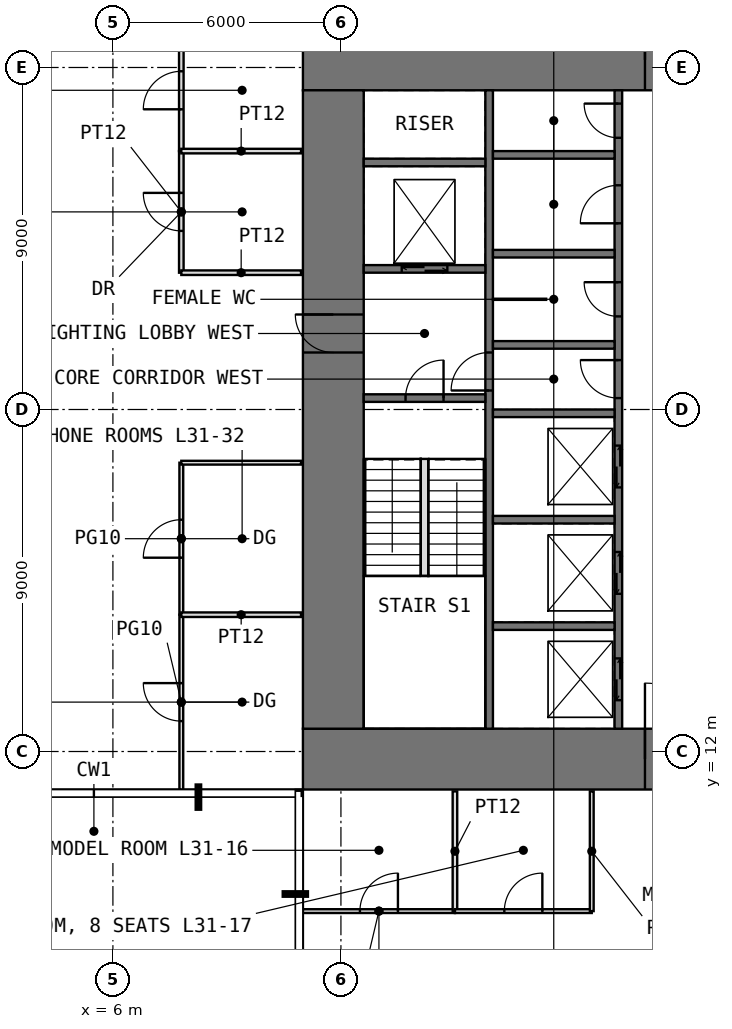
"""IFC4 building model, lengths in metres.
Left out: names, types, materials, properties, quantities, classifications, styles, units other than length and angle.
Written with IfcOpenShell. Run it as: python <this file> out.ifc"""

import sys

from ifc_helpers import new_model, si_unit, direction, frame, frame_2d, origin, place, context, subcontext, project, spatial, rectangle, extrude, element, fill, save


model = new_model("IFC4")
c1 = context("Model", 3, precision=1e-05, world=origin(), true_north=direction((0.0, 1.0)))
c2 = subcontext(c1, "Body", "Model", "MODEL_VIEW")
j1 = project(units=[si_unit("LENGTHUNIT", "METRE"), si_unit("PLANEANGLEUNIT", "RADIAN")], contexts=[c1])
p1 = place(None, origin())
s1 = spatial("IfcSite", under=j1, at=p1, CompositionType="ELEMENT")
p2 = place(p1, origin())
s2 = spatial("IfcBuilding", under=s1, at=p2, CompositionType="ELEMENT")
p3 = place(p2, frame((0.0, 0.0, 132.5)))
s3 = spatial("IfcBuildingStorey", under=s2, at=p3, CompositionType="ELEMENT", Elevation=132.5)
p4 = place(p3, frame((11.0, 11.8, -0.05), z_axis=(0.0, 0.0, 1.0), x_axis=(1.0, 0.0, 0.0)))
e1 = element("IfcWall", 1, at=p4, inside=s3, PredefinedType="SHEAR", context=c2, shape_type="SweptSolid", body=[
    extrude(rectangle(XDim=20.0, YDim=1.6, at=frame_2d((10.0, 0.0))), origin(), (0.0, 0.0, 1.0), 4.0),
])
p5 = place(p4, frame((9.0, 0.0, 0.05)))
e2 = element("IfcOpeningElement", 2, at=p5, cuts=e1, PredefinedType="OPENING", context=c2, shape_type="SweptSolid", body=[
    extrude(rectangle(XDim=2.0, YDim=2.2, at=frame_2d((1.0, 1.1))), frame((0.0, 0.81, 0.0), z_axis=(0.0, -1.0, 0.0), x_axis=(1.0, 0.0, 0.0)), (0.0, 0.0, 1.0), 1.62),
])
p6 = place(p3, frame((11.0, 30.2, -0.05), z_axis=(0.0, 0.0, 1.0), x_axis=(1.0, 0.0, 0.0)))
e3 = element("IfcWall", 3, at=p6, inside=s3, PredefinedType="SHEAR", context=c2, shape_type="SweptSolid", body=[
    extrude(rectangle(XDim=20.0, YDim=1.6, at=frame_2d((10.0, 0.0))), origin(), (0.0, 0.0, 1.0), 4.0),
])
p7 = place(p6, frame((9.0, 0.0, 0.05)))
e4 = element("IfcOpeningElement", 4, at=p7, cuts=e3, PredefinedType="OPENING", context=c2, shape_type="SweptSolid", body=[
    extrude(rectangle(XDim=2.0, YDim=2.2, at=frame_2d((1.0, 1.1))), frame((0.0, 0.81, 0.0), z_axis=(0.0, -1.0, 0.0), x_axis=(1.0, 0.0, 0.0)), (0.0, 0.0, 1.0), 1.62),
])
p8 = place(p3, frame((11.8, 12.6, -0.05), z_axis=(0.0, 0.0, 1.0), x_axis=(0.0, 1.0, 0.0)))
e5 = element("IfcWall", 5, at=p8, inside=s3, PredefinedType="SHEAR", context=c2, shape_type="SweptSolid", body=[
    extrude(rectangle(XDim=16.8, YDim=1.6, at=frame_2d((8.4, 0.0))), origin(), (0.0, 0.0, 1.0), 4.0),
])
p9 = place(p8, frame((9.9, 0.0, 0.05)))
e6 = element("IfcOpeningElement", 6, at=p9, cuts=e5, PredefinedType="OPENING", context=c2, shape_type="SweptSolid", body=[
    extrude(rectangle(XDim=1.0, YDim=2.2, at=frame_2d((0.5, 1.1))), frame((0.0, 0.81, 0.0), z_axis=(0.0, -1.0, 0.0), x_axis=(1.0, 0.0, 0.0)), (0.0, 0.0, 1.0), 1.62),
])
p10 = place(p3, frame((15.9, 12.6, -0.05), z_axis=(0.0, 0.0, 1.0), x_axis=(0.0, 1.0, 0.0)))
e7 = element("IfcWall", 7, at=p10, inside=s3, PredefinedType="SHEAR", context=c2, shape_type="SweptSolid", body=[
    extrude(rectangle(XDim=16.8, YDim=0.2, at=frame_2d((8.4, 0.0))), origin(), (0.0, 0.0, 1.0), 4.0),
])
p11 = place(p10, frame((8.9, 0.0, 0.05)))
e8 = element("IfcOpeningElement", 8, at=p11, cuts=e7, PredefinedType="OPENING", context=c2, shape_type="SweptSolid", body=[
    extrude(rectangle(XDim=1.0, YDim=2.2, at=frame_2d((0.5, 1.1))), frame((0.0, 0.11, 0.0), z_axis=(0.0, -1.0, 0.0), x_axis=(1.0, 0.0, 0.0)), (0.0, 0.0, 1.0), 0.22),
])
p12 = place(p3, frame((19.3, 12.6, -0.05), z_axis=(0.0, 0.0, 1.0), x_axis=(0.0, 1.0, 0.0)))
e9 = element("IfcWall", 9, at=p12, inside=s3, PredefinedType="SHEAR", context=c2, shape_type="SweptSolid", body=[
    extrude(rectangle(XDim=16.8, YDim=0.2, at=frame_2d((8.4, 0.0))), origin(), (0.0, 0.0, 1.0), 4.0),
])
p13 = place(p12, frame((8.7, 0.0, 0.05)))
e10 = element("IfcOpeningElement", 10, at=p13, cuts=e9, PredefinedType="OPENING", context=c2, shape_type="SweptSolid", body=[
    extrude(rectangle(XDim=1.0, YDim=2.2, at=frame_2d((0.5, 1.1))), frame((0.0, 0.11, 0.0), z_axis=(0.0, -1.0, 0.0), x_axis=(1.0, 0.0, 0.0)), (0.0, 0.0, 1.0), 0.22),
])
p14 = place(p12, frame((10.85, 0.0, 0.05)))
e11 = element("IfcOpeningElement", 11, at=p14, cuts=e9, PredefinedType="OPENING", context=c2, shape_type="SweptSolid", body=[
    extrude(rectangle(XDim=0.9, YDim=2.2, at=frame_2d((0.45, 1.1))), frame((0.0, 0.11, 0.0), z_axis=(0.0, -1.0, 0.0), x_axis=(1.0, 0.0, 0.0)), (0.0, 0.0, 1.0), 0.22),
])
p15 = place(p12, frame((13.3, 0.0, 0.05)))
e12 = element("IfcOpeningElement", 12, at=p15, cuts=e9, PredefinedType="OPENING", context=c2, shape_type="SweptSolid", body=[
    extrude(rectangle(XDim=1.0, YDim=2.2, at=frame_2d((0.5, 1.1))), frame((0.0, 0.11, 0.0), z_axis=(0.0, -1.0, 0.0), x_axis=(1.0, 0.0, 0.0)), (0.0, 0.0, 1.0), 0.22),
])
p16 = place(p12, frame((15.55, 0.0, 0.05)))
e13 = element("IfcOpeningElement", 13, at=p16, cuts=e9, PredefinedType="OPENING", context=c2, shape_type="SweptSolid", body=[
    extrude(rectangle(XDim=0.9, YDim=2.2, at=frame_2d((0.45, 1.1))), frame((0.0, 0.11, 0.0), z_axis=(0.0, -1.0, 0.0), x_axis=(1.0, 0.0, 0.0)), (0.0, 0.0, 1.0), 0.22),
])
p17 = place(p12, frame((0.75, 0.0, 0.05)))
e14 = element("IfcOpeningElement", 14, at=p17, cuts=e9, PredefinedType="OPENING", context=c2, shape_type="SweptSolid", body=[
    extrude(rectangle(XDim=1.1, YDim=2.2, at=frame_2d((0.55, 1.1))), frame((0.0, 0.11, 0.0), z_axis=(0.0, -1.0, 0.0), x_axis=(1.0, 0.0, 0.0)), (0.0, 0.0, 1.0), 0.22),
])
p18 = place(p12, frame((3.55, 0.0, 0.05)))
e15 = element("IfcOpeningElement", 15, at=p18, cuts=e9, PredefinedType="OPENING", context=c2, shape_type="SweptSolid", body=[
    extrude(rectangle(XDim=1.1, YDim=2.2, at=frame_2d((0.55, 1.1))), frame((0.0, 0.11, 0.0), z_axis=(0.0, -1.0, 0.0), x_axis=(1.0, 0.0, 0.0)), (0.0, 0.0, 1.0), 0.22),
])
p19 = place(p12, frame((6.35, 0.0, 0.05)))
e16 = element("IfcOpeningElement", 16, at=p19, cuts=e9, PredefinedType="OPENING", context=c2, shape_type="SweptSolid", body=[
    extrude(rectangle(XDim=1.1, YDim=2.2, at=frame_2d((0.55, 1.1))), frame((0.0, 0.11, 0.0), z_axis=(0.0, -1.0, 0.0), x_axis=(1.0, 0.0, 0.0)), (0.0, 0.0, 1.0), 0.22),
])
p20 = place(p3, frame((12.6, 21.3, -0.05), z_axis=(0.0, 0.0, 1.0), x_axis=(1.0, 0.0, 0.0)))
e17 = element("IfcWall", 17, at=p20, inside=s3, PredefinedType="SHEAR", context=c2, shape_type="SweptSolid", body=[
    extrude(rectangle(XDim=3.2, YDim=0.2, at=frame_2d((1.6, 0.0))), origin(), (0.0, 0.0, 1.0), 4.0),
])
p21 = place(p20, frame((1.1, 0.0, 0.05)))
e18 = element("IfcOpeningElement", 18, at=p21, cuts=e17, PredefinedType="OPENING", context=c2, shape_type="SweptSolid", body=[
    extrude(rectangle(XDim=1.0, YDim=2.2, at=frame_2d((0.5, 1.1))), frame((0.0, 0.11, 0.0), z_axis=(0.0, -1.0, 0.0), x_axis=(1.0, 0.0, 0.0)), (0.0, 0.0, 1.0), 0.22),
])
p22 = place(p3, frame((12.6, 24.7, -0.05), z_axis=(0.0, 0.0, 1.0), x_axis=(1.0, 0.0, 0.0)))
e19 = element("IfcWall", 19, at=p22, inside=s3, PredefinedType="SHEAR", context=c2, shape_type="SweptSolid", body=[
    extrude(rectangle(XDim=3.2, YDim=0.2, at=frame_2d((1.6, 0.0))), origin(), (0.0, 0.0, 1.0), 4.0),
])
p23 = place(p22, frame((1.0, 0.0, 0.05)))
e20 = element("IfcOpeningElement", 20, at=p23, cuts=e19, PredefinedType="OPENING", context=c2, shape_type="SweptSolid", body=[
    extrude(rectangle(XDim=1.2, YDim=2.2, at=frame_2d((0.6, 1.1))), frame((0.0, 0.11, 0.0), z_axis=(0.0, -1.0, 0.0), x_axis=(1.0, 0.0, 0.0)), (0.0, 0.0, 1.0), 0.22),
])
for number, where, z_axis, x_axis in (
    (21, (12.6, 27.5, -0.05), (0.0, 0.0, 1.0), (1.0, 0.0, 0.0)),
    (22, (16.0, 15.3, -0.05), (0.0, 0.0, 1.0), (1.0, 0.0, 0.0)),
    (23, (16.0, 18.1, -0.05), (0.0, 0.0, 1.0), (1.0, 0.0, 0.0)),
    (24, (16.0, 20.9, -0.05), (0.0, 0.0, 1.0), (1.0, 0.0, 0.0)),
    (25, (16.0, 22.7, -0.05), (0.0, 0.0, 1.0), (1.0, 0.0, 0.0)),
    (26, (16.0, 25.1, -0.05), (0.0, 0.0, 1.0), (1.0, 0.0, 0.0)),
    (27, (16.0, 27.7, -0.05), (0.0, 0.0, 1.0), (1.0, 0.0, 0.0)),
):
    element("IfcWall", number, at=place(p3, frame(where, z_axis=z_axis, x_axis=x_axis)), inside=s3, PredefinedType="SHEAR", context=c2, shape_type="SweptSolid", body=[
        extrude(rectangle(XDim=3.2, YDim=0.2, at=frame_2d((1.6, 0.0))), origin(), (0.0, 0.0, 1.0), 4.0),
    ])
p24 = place(p3, frame((16.0, 23.9, 0.0), z_axis=(0.0, 0.0, 1.0), x_axis=(1.0, 0.0, 0.0)))
e28 = element("IfcWall", 28, at=p24, inside=s3, PredefinedType="PARTITIONING", context=c2, shape_type="SweptSolid", body=[
    extrude(rectangle(XDim=1.4, YDim=0.03, at=frame_2d((0.7, 0.0))), origin(), (0.0, 0.0, 1.0), 3.75),
])
p25 = place(p3, frame((7.8, 11.0, 0.0), z_axis=(0.0, 0.0, 1.0), x_axis=(0.0, 1.0, 0.0)))
e29 = element("IfcWall", 29, at=p25, inside=s3, PredefinedType="PARTITIONING", context=c2, shape_type="SweptSolid", body=[
    extrude(rectangle(XDim=4.6, YDim=0.1, at=frame_2d((2.3, 0.0))), origin(), (0.0, 0.0, 1.0), 3.75),
])
p26 = place(p25, frame((1.8, 0.0, 0.0)))
e30 = element("IfcOpeningElement", 30, at=p26, cuts=e29, PredefinedType="OPENING", context=c2, shape_type="SweptSolid", body=[
    extrude(rectangle(XDim=1.0, YDim=2.4, at=frame_2d((0.5, 1.2))), frame((0.0, 0.06, 0.0), z_axis=(0.0, -1.0, 0.0), x_axis=(1.0, 0.0, 0.0)), (0.0, 0.0, 1.0), 0.12),
])
p27 = place(p3, frame((7.8, 15.6, 0.0), z_axis=(0.0, 0.0, 1.0), x_axis=(0.0, 1.0, 0.0)))
e31 = element("IfcWall", 31, at=p27, inside=s3, PredefinedType="PARTITIONING", context=c2, shape_type="SweptSolid", body=[
    extrude(rectangle(XDim=4.0, YDim=0.1, at=frame_2d((2.0, 0.0))), origin(), (0.0, 0.0, 1.0), 3.75),
])
p28 = place(p27, frame((1.5, 0.0, 0.0)))
e32 = element("IfcOpeningElement", 32, at=p28, cuts=e31, PredefinedType="OPENING", context=c2, shape_type="SweptSolid", body=[
    extrude(rectangle(XDim=1.0, YDim=2.4, at=frame_2d((0.5, 1.2))), frame((0.0, 0.06, 0.0), z_axis=(0.0, -1.0, 0.0), x_axis=(1.0, 0.0, 0.0)), (0.0, 0.0, 1.0), 0.12),
])
p29 = place(p3, frame((7.8, 15.6, 0.0), z_axis=(0.0, 0.0, 1.0), x_axis=(1.0, 0.0, 0.0)))
e33 = element("IfcWall", 33, at=p29, inside=s3, PredefinedType="PARTITIONING", context=c2, shape_type="SweptSolid", body=[
    extrude(rectangle(XDim=3.15, YDim=0.12, at=frame_2d((1.575, 0.0))), origin(), (0.0, 0.0, 1.0), 3.75),
])
p30 = place(p3, frame((7.8, 19.6, 0.0), z_axis=(0.0, 0.0, 1.0), x_axis=(1.0, 0.0, 0.0)))
e34 = element("IfcWall", 34, at=p30, inside=s3, PredefinedType="PARTITIONING", context=c2, shape_type="SweptSolid", body=[
    extrude(rectangle(XDim=3.15, YDim=0.1, at=frame_2d((1.575, 0.0))), origin(), (0.0, 0.0, 1.0), 3.75),
])
p31 = place(p3, frame((7.8, 24.6, 0.0), z_axis=(0.0, 0.0, 1.0), x_axis=(0.0, 1.0, 0.0)))
e35 = element("IfcWall", 35, at=p31, inside=s3, PredefinedType="PARTITIONING", context=c2, shape_type="SweptSolid", body=[
    extrude(rectangle(XDim=3.2, YDim=0.12, at=frame_2d((1.6, 0.0))), origin(), (0.0, 0.0, 1.0), 3.75),
])
p32 = place(p31, frame((1.1, 0.0, 0.0)))
e36 = element("IfcOpeningElement", 36, at=p32, cuts=e35, PredefinedType="OPENING", context=c2, shape_type="SweptSolid", body=[
    extrude(rectangle(XDim=1.0, YDim=2.2, at=frame_2d((0.5, 1.1))), frame((0.0, 0.07, 0.0), z_axis=(0.0, -1.0, 0.0), x_axis=(1.0, 0.0, 0.0)), (0.0, 0.0, 1.0), 0.14),
])
p33 = place(p3, frame((7.8, 24.6, 0.0), z_axis=(0.0, 0.0, 1.0), x_axis=(1.0, 0.0, 0.0)))
e37 = element("IfcWall", 37, at=p33, inside=s3, PredefinedType="PARTITIONING", context=c2, shape_type="SweptSolid", body=[
    extrude(rectangle(XDim=3.15, YDim=0.12, at=frame_2d((1.575, 0.0))), origin(), (0.0, 0.0, 1.0), 3.75),
])
p34 = place(p3, frame((7.8, 27.8, 0.0), z_axis=(0.0, 0.0, 1.0), x_axis=(0.0, 1.0, 0.0)))
e38 = element("IfcWall", 38, at=p34, inside=s3, PredefinedType="PARTITIONING", context=c2, shape_type="SweptSolid", body=[
    extrude(rectangle(XDim=3.2, YDim=0.12, at=frame_2d((1.6, 0.0))), origin(), (0.0, 0.0, 1.0), 3.75),
])
p35 = place(p34, frame((1.1, 0.0, 0.0)))
e39 = element("IfcOpeningElement", 39, at=p35, cuts=e38, PredefinedType="OPENING", context=c2, shape_type="SweptSolid", body=[
    extrude(rectangle(XDim=1.0, YDim=2.2, at=frame_2d((0.5, 1.1))), frame((0.0, 0.07, 0.0), z_axis=(0.0, -1.0, 0.0), x_axis=(1.0, 0.0, 0.0)), (0.0, 0.0, 1.0), 0.14),
])
p36 = place(p3, frame((7.8, 27.8, 0.0), z_axis=(0.0, 0.0, 1.0), x_axis=(1.0, 0.0, 0.0)))
e40 = element("IfcWall", 40, at=p36, inside=s3, PredefinedType="PARTITIONING", context=c2, shape_type="SweptSolid", body=[
    extrude(rectangle(XDim=3.15, YDim=0.12, at=frame_2d((1.575, 0.0))), origin(), (0.0, 0.0, 1.0), 3.75),
])
p37 = place(p3, frame((11.0, 7.8, 0.0), z_axis=(0.0, 0.0, 1.0), x_axis=(1.0, 0.0, 0.0)))
e41 = element("IfcWall", 41, at=p37, inside=s3, PredefinedType="PARTITIONING", context=c2, shape_type="SweptSolid", body=[
    extrude(rectangle(XDim=4.0, YDim=0.1, at=frame_2d((2.0, 0.0))), origin(), (0.0, 0.0, 1.0), 3.75),
])
p38 = place(p37, frame((1.5, 0.0, 0.0)))
e42 = element("IfcOpeningElement", 42, at=p38, cuts=e41, PredefinedType="OPENING", context=c2, shape_type="SweptSolid", body=[
    extrude(rectangle(XDim=1.0, YDim=2.4, at=frame_2d((0.5, 1.2))), frame((0.0, 0.06, 0.0), z_axis=(0.0, -1.0, 0.0), x_axis=(1.0, 0.0, 0.0)), (0.0, 0.0, 1.0), 0.12),
])
p39 = place(p3, frame((15.0, 7.8, 0.0), z_axis=(0.0, 0.0, 1.0), x_axis=(0.0, 1.0, 0.0)))
e43 = element("IfcWall", 43, at=p39, inside=s3, PredefinedType="PARTITIONING", context=c2, shape_type="SweptSolid", body=[
    extrude(rectangle(XDim=3.15, YDim=0.12, at=frame_2d((1.575, 0.0))), origin(), (0.0, 0.0, 1.0), 3.75),
])
p40 = place(p3, frame((15.0, 7.8, 0.0), z_axis=(0.0, 0.0, 1.0), x_axis=(1.0, 0.0, 0.0)))
e44 = element("IfcWall", 44, at=p40, inside=s3, PredefinedType="PARTITIONING", context=c2, shape_type="SweptSolid", body=[
    extrude(rectangle(XDim=3.6, YDim=0.1, at=frame_2d((1.8, 0.0))), origin(), (0.0, 0.0, 1.0), 3.75),
])
p41 = place(p40, frame((1.3, 0.0, 0.0)))
e45 = element("IfcOpeningElement", 45, at=p41, cuts=e44, PredefinedType="OPENING", context=c2, shape_type="SweptSolid", body=[
    extrude(rectangle(XDim=1.0, YDim=2.4, at=frame_2d((0.5, 1.2))), frame((0.0, 0.06, 0.0), z_axis=(0.0, -1.0, 0.0), x_axis=(1.0, 0.0, 0.0)), (0.0, 0.0, 1.0), 0.12),
])
p42 = place(p3, frame((18.6, 7.8, 0.0), z_axis=(0.0, 0.0, 1.0), x_axis=(0.0, 1.0, 0.0)))
e46 = element("IfcWall", 46, at=p42, inside=s3, PredefinedType="PARTITIONING", context=c2, shape_type="SweptSolid", body=[
    extrude(rectangle(XDim=3.15, YDim=0.1, at=frame_2d((1.575, 0.0))), origin(), (0.0, 0.0, 1.0), 3.75),
])
p43 = place(p3, frame((14.2, 16.62, 0.0), z_axis=(0.0, 0.0, 1.0), x_axis=(0.0, 1.0, 0.0)))
e47 = element("IfcWall", 47, at=p43, inside=s3, PredefinedType="PARTITIONING", context=c2, shape_type="SweptSolid", body=[
    extrude(rectangle(XDim=3.08, YDim=0.2, at=frame_2d((1.54, 0.0))), origin(), (0.0, 0.0, 1.0), 4.0),
])
p44 = place(p5, origin())
e48 = element("IfcDoor", 48, at=p44, inside=s3, OperationType="DOUBLE_DOOR_SINGLE_SWING", PredefinedType="DOOR", context=c2, shape_type="SweptSolid", body=[
    extrude(rectangle(XDim=2.0, YDim=2.2, at=frame_2d((1.0, 1.1))), frame((0.0, 0.025, 0.0), z_axis=(0.0, -1.0, 0.0), x_axis=(1.0, 0.0, 0.0)), (0.0, 0.0, 1.0), 0.05),
])
fill(e2, e48)
p45 = place(p7, origin())
e49 = element("IfcDoor", 49, at=p45, inside=s3, OperationType="DOUBLE_DOOR_SINGLE_SWING", PredefinedType="DOOR", context=c2, shape_type="SweptSolid", body=[
    extrude(rectangle(XDim=2.0, YDim=2.2, at=frame_2d((1.0, 1.1))), frame((0.0, 0.025, 0.0), z_axis=(0.0, -1.0, 0.0), x_axis=(1.0, 0.0, 0.0)), (0.0, 0.0, 1.0), 0.05),
])
fill(e4, e49)
p46 = place(p9, origin())
e50 = element("IfcDoor", 50, at=p46, inside=s3, OperationType="SINGLE_SWING_RIGHT", PredefinedType="DOOR", context=c2, shape_type="SweptSolid", body=[
    extrude(rectangle(XDim=1.0, YDim=2.2, at=frame_2d((0.5, 1.1))), frame((0.0, 0.025, 0.0), z_axis=(0.0, -1.0, 0.0), x_axis=(1.0, 0.0, 0.0)), (0.0, 0.0, 1.0), 0.05),
])
fill(e6, e50)
p47 = place(p21, origin())
e51 = element("IfcDoor", 51, at=p47, inside=s3, OperationType="SINGLE_SWING_RIGHT", PredefinedType="DOOR", context=c2, shape_type="SweptSolid", body=[
    extrude(rectangle(XDim=1.0, YDim=2.2, at=frame_2d((0.5, 1.1))), frame((0.0, 0.025, 0.0), z_axis=(0.0, -1.0, 0.0), x_axis=(1.0, 0.0, 0.0)), (0.0, 0.0, 1.0), 0.05),
])
fill(e18, e51)
p48 = place(p11, origin())
e52 = element("IfcDoor", 52, at=p48, inside=s3, OperationType="SINGLE_SWING_LEFT", PredefinedType="DOOR", context=c2, shape_type="SweptSolid", body=[
    extrude(rectangle(XDim=1.0, YDim=2.2, at=frame_2d((0.5, 1.1))), frame((0.0, 0.025, 0.0), z_axis=(0.0, -1.0, 0.0), x_axis=(1.0, 0.0, 0.0)), (0.0, 0.0, 1.0), 0.05),
])
fill(e8, e52)
p49 = place(p13, origin())
e53 = element("IfcDoor", 53, at=p49, inside=s3, OperationType="SINGLE_SWING_RIGHT", PredefinedType="DOOR", context=c2, shape_type="SweptSolid", body=[
    extrude(rectangle(XDim=1.0, YDim=2.2, at=frame_2d((0.5, 1.1))), frame((0.0, 0.025, 0.0), z_axis=(0.0, -1.0, 0.0), x_axis=(1.0, 0.0, 0.0)), (0.0, 0.0, 1.0), 0.05),
])
fill(e10, e53)
p50 = place(p14, origin())
e54 = element("IfcDoor", 54, at=p50, inside=s3, OperationType="SINGLE_SWING_RIGHT", PredefinedType="DOOR", context=c2, shape_type="SweptSolid", body=[
    extrude(rectangle(XDim=0.9, YDim=2.2, at=frame_2d((0.45, 1.1))), frame((0.0, 0.025, 0.0), z_axis=(0.0, -1.0, 0.0), x_axis=(1.0, 0.0, 0.0)), (0.0, 0.0, 1.0), 0.05),
])
fill(e11, e54)
p51 = place(p15, origin())
e55 = element("IfcDoor", 55, at=p51, inside=s3, OperationType="SINGLE_SWING_LEFT", PredefinedType="DOOR", context=c2, shape_type="SweptSolid", body=[
    extrude(rectangle(XDim=1.0, YDim=2.2, at=frame_2d((0.5, 1.1))), frame((0.0, 0.025, 0.0), z_axis=(0.0, -1.0, 0.0), x_axis=(1.0, 0.0, 0.0)), (0.0, 0.0, 1.0), 0.05),
])
fill(e12, e55)
p52 = place(p16, origin())
e56 = element("IfcDoor", 56, at=p52, inside=s3, OperationType="SINGLE_SWING_RIGHT", PredefinedType="DOOR", context=c2, shape_type="SweptSolid", body=[
    extrude(rectangle(XDim=0.9, YDim=2.2, at=frame_2d((0.45, 1.1))), frame((0.0, 0.025, 0.0), z_axis=(0.0, -1.0, 0.0), x_axis=(1.0, 0.0, 0.0)), (0.0, 0.0, 1.0), 0.05),
])
fill(e13, e56)
p53 = place(p38, origin())
e57 = element("IfcDoor", 57, at=p53, inside=s3, OperationType="SINGLE_SWING_RIGHT", PredefinedType="DOOR", context=c2, shape_type="SweptSolid", body=[
    extrude(rectangle(XDim=1.0, YDim=2.4, at=frame_2d((0.5, 1.2))), frame((0.0, 0.025, 0.0), z_axis=(0.0, -1.0, 0.0), x_axis=(1.0, 0.0, 0.0)), (0.0, 0.0, 1.0), 0.05),
])
fill(e42, e57)
p54 = place(p41, origin())
e58 = element("IfcDoor", 58, at=p54, inside=s3, OperationType="SINGLE_SWING_RIGHT", PredefinedType="DOOR", context=c2, shape_type="SweptSolid", body=[
    extrude(rectangle(XDim=1.0, YDim=2.4, at=frame_2d((0.5, 1.2))), frame((0.0, 0.025, 0.0), z_axis=(0.0, -1.0, 0.0), x_axis=(1.0, 0.0, 0.0)), (0.0, 0.0, 1.0), 0.05),
])
fill(e45, e58)
p55 = place(p26, origin())
e59 = element("IfcDoor", 59, at=p55, inside=s3, OperationType="SINGLE_SWING_RIGHT", PredefinedType="DOOR", context=c2, shape_type="SweptSolid", body=[
    extrude(rectangle(XDim=1.0, YDim=2.4, at=frame_2d((0.5, 1.2))), frame((0.0, 0.025, 0.0), z_axis=(0.0, -1.0, 0.0), x_axis=(1.0, 0.0, 0.0)), (0.0, 0.0, 1.0), 0.05),
])
fill(e30, e59)
p56 = place(p28, origin())
e60 = element("IfcDoor", 60, at=p56, inside=s3, OperationType="SINGLE_SWING_LEFT", PredefinedType="DOOR", context=c2, shape_type="SweptSolid", body=[
    extrude(rectangle(XDim=1.0, YDim=2.4, at=frame_2d((0.5, 1.2))), frame((0.0, 0.025, 0.0), z_axis=(0.0, -1.0, 0.0), x_axis=(1.0, 0.0, 0.0)), (0.0, 0.0, 1.0), 0.05),
])
fill(e32, e60)
p57 = place(p32, origin())
e61 = element("IfcDoor", 61, at=p57, inside=s3, OperationType="SINGLE_SWING_RIGHT", PredefinedType="DOOR", context=c2, shape_type="SweptSolid", body=[
    extrude(rectangle(XDim=1.0, YDim=2.2, at=frame_2d((0.5, 1.1))), frame((0.0, 0.025, 0.0), z_axis=(0.0, -1.0, 0.0), x_axis=(1.0, 0.0, 0.0)), (0.0, 0.0, 1.0), 0.05),
])
fill(e36, e61)
p58 = place(p35, origin())
e62 = element("IfcDoor", 62, at=p58, inside=s3, OperationType="SINGLE_SWING_LEFT", PredefinedType="DOOR", context=c2, shape_type="SweptSolid", body=[
    extrude(rectangle(XDim=1.0, YDim=2.2, at=frame_2d((0.5, 1.1))), frame((0.0, 0.025, 0.0), z_axis=(0.0, -1.0, 0.0), x_axis=(1.0, 0.0, 0.0)), (0.0, 0.0, 1.0), 0.05),
])
fill(e39, e62)
p59 = place(p17, origin())
e63 = element("IfcDoor", 63, at=p59, inside=s3, OperationType="DOUBLE_DOOR_SLIDING", PredefinedType="DOOR", context=c2, shape_type="SweptSolid", body=[
    extrude(rectangle(XDim=1.1, YDim=2.2, at=frame_2d((0.55, 1.1))), frame((0.0, 0.025, 0.0), z_axis=(0.0, -1.0, 0.0), x_axis=(1.0, 0.0, 0.0)), (0.0, 0.0, 1.0), 0.05),
])
fill(e14, e63)
p60 = place(p18, origin())
e64 = element("IfcDoor", 64, at=p60, inside=s3, OperationType="DOUBLE_DOOR_SLIDING", PredefinedType="DOOR", context=c2, shape_type="SweptSolid", body=[
    extrude(rectangle(XDim=1.1, YDim=2.2, at=frame_2d((0.55, 1.1))), frame((0.0, 0.025, 0.0), z_axis=(0.0, -1.0, 0.0), x_axis=(1.0, 0.0, 0.0)), (0.0, 0.0, 1.0), 0.05),
])
fill(e15, e64)
p61 = place(p19, origin())
e65 = element("IfcDoor", 65, at=p61, inside=s3, OperationType="DOUBLE_DOOR_SLIDING", PredefinedType="DOOR", context=c2, shape_type="SweptSolid", body=[
    extrude(rectangle(XDim=1.1, YDim=2.2, at=frame_2d((0.55, 1.1))), frame((0.0, 0.025, 0.0), z_axis=(0.0, -1.0, 0.0), x_axis=(1.0, 0.0, 0.0)), (0.0, 0.0, 1.0), 0.05),
])
fill(e16, e65)
p62 = place(p23, origin())
e66 = element("IfcDoor", 66, at=p62, inside=s3, OperationType="DOUBLE_DOOR_SLIDING", PredefinedType="DOOR", context=c2, shape_type="SweptSolid", body=[
    extrude(rectangle(XDim=1.2, YDim=2.2, at=frame_2d((0.6, 1.1))), frame((0.0, 0.025, 0.0), z_axis=(0.0, -1.0, 0.0), x_axis=(1.0, 0.0, 0.0)), (0.0, 0.0, 1.0), 0.05),
])
fill(e20, e66)
save(model, sys.argv[1])
